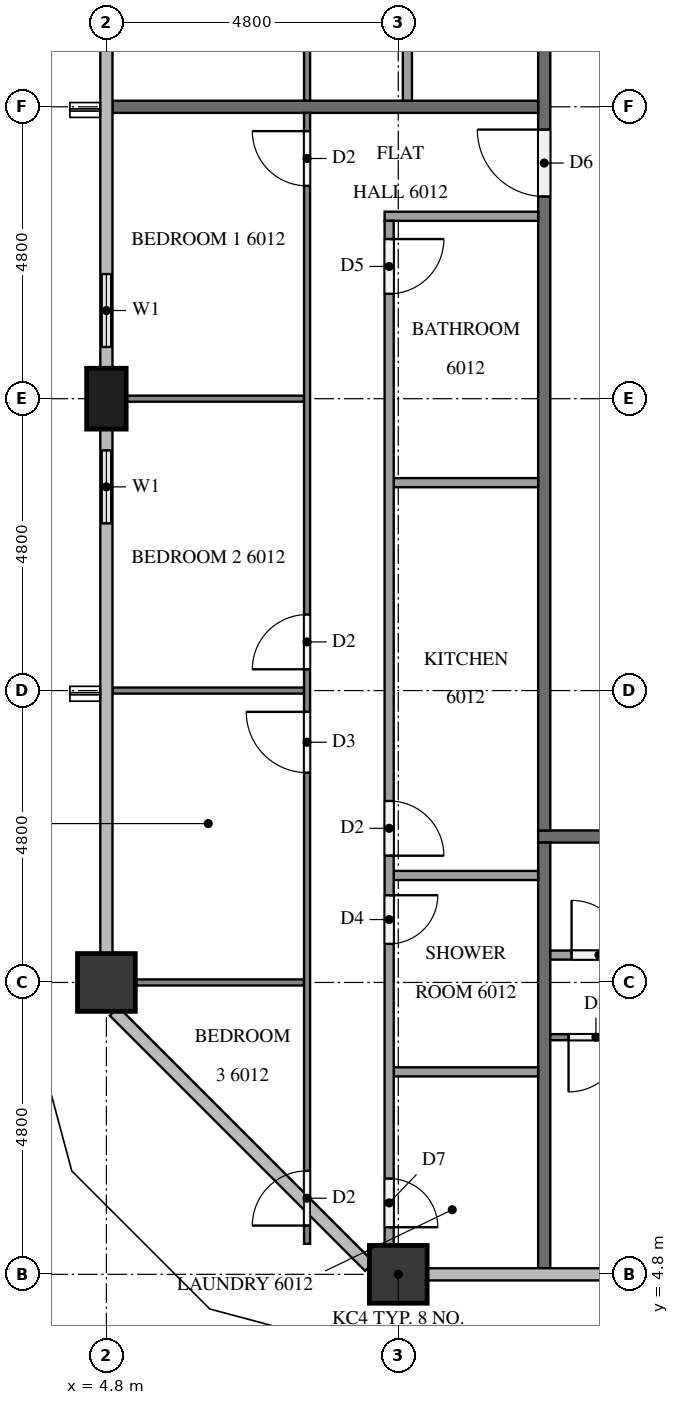
"""IFC4 building model, lengths in metres.
Left out: names, types, materials, properties, quantities, classifications, styles, units other than length and angle.
Written with IfcOpenShell. Run it as: python <this file> out.ifc"""

import sys

from ifc_helpers import new_model, si_unit, direction, frame, frame_2d, origin, origin_2d, place, context, subcontext, project, spatial, rectangle, extrude, element, fill, save


model = new_model("IFC4")
c1 = context("Model", 3, precision=1e-05, world=origin(), true_north=direction((0.0, 1.0)))
c2 = subcontext(c1, "Body", "Model", "MODEL_VIEW")
j1 = project(units=[si_unit("LENGTHUNIT", "METRE"), si_unit("PLANEANGLEUNIT", "RADIAN")], contexts=[c1])
p1 = place(None, origin())
s1 = spatial("IfcSite", under=j1, at=p1, CompositionType="ELEMENT")
p2 = place(p1, origin())
s2 = spatial("IfcBuilding", under=s1, at=p2, CompositionType="ELEMENT")
p3 = place(p2, frame((0.0, 0.0, 229.8)))
s3 = spatial("IfcBuildingStorey", under=s2, at=p3, CompositionType="ELEMENT", Elevation=229.8)
p4 = place(p3, frame((9.6, 4.8, 0.0), z_axis=(0.0, 0.0, 1.0), x_axis=(1.0, 0.0, 0.0)))
e1 = element("IfcColumn", 1, at=p4, inside=s3, PredefinedType="COLUMN", context=c2, shape_type="SweptSolid", body=[
    extrude(rectangle(XDim=0.95, YDim=0.95, at=origin_2d()), origin(), (0.0, 0.0, 1.0), 3.1),
])
p5 = place(p3, frame((4.8, 19.2, 0.0), z_axis=(0.0, 0.0, 1.0), x_axis=(0.0, 1.0, 0.0)))
e2 = element("IfcColumn", 2, at=p5, inside=s3, PredefinedType="COLUMN", context=c2, shape_type="SweptSolid", body=[
    extrude(rectangle(XDim=1.0, YDim=0.65, at=origin_2d()), origin(), (0.0, 0.0, 1.0), 3.1),
])
p6 = place(p3, frame((4.8, 9.6, 0.0), z_axis=(0.0, 0.0, 1.0), x_axis=(1.0, 0.0, 0.0)))
e3 = element("IfcColumn", 3, at=p6, inside=s3, PredefinedType="COLUMN", context=c2, shape_type="SweptSolid", body=[
    extrude(rectangle(XDim=0.95, YDim=0.95, at=origin_2d()), origin(), (0.0, 0.0, 1.0), 3.1),
])
p7 = place(p3, frame((4.8, 21.6, 0.0), z_axis=(0.0, 0.0, 1.0), x_axis=(0.0, -1.0, 0.0)))
e4 = element("IfcWall", 4, at=p7, inside=s3, PredefinedType="SOLIDWALL", context=c2, shape_type="SweptSolid", body=[
    extrude(rectangle(XDim=1.9, YDim=0.15, at=frame_2d((0.95, 0.0))), origin(), (0.0, 0.0, 1.0), 3.1),
])
p8 = place(p7, frame((0.35, 0.0, 0.9)))
e5 = element("IfcOpeningElement", 5, at=p8, cuts=e4, PredefinedType="OPENING", context=c2, shape_type="SweptSolid", body=[
    extrude(rectangle(XDim=1.2, YDim=1.4, at=frame_2d((0.6, 0.7))), frame((0.0, 0.085, 0.0), z_axis=(0.0, -1.0, 0.0), x_axis=(1.0, 0.0, 0.0)), (0.0, 0.0, 1.0), 0.17),
])
p9 = place(p3, frame((4.8, 18.7, 0.0), z_axis=(0.0, 0.0, 1.0), x_axis=(0.0, -1.0, 0.0)))
e6 = element("IfcWall", 6, at=p9, inside=s3, PredefinedType="SOLIDWALL", context=c2, shape_type="SweptSolid", body=[
    extrude(rectangle(XDim=1.9, YDim=0.15, at=frame_2d((0.95, 0.0))), origin(), (0.0, 0.0, 1.0), 3.1),
])
p10 = place(p9, frame((0.35, 0.0, 0.9)))
e7 = element("IfcOpeningElement", 7, at=p10, cuts=e6, PredefinedType="OPENING", context=c2, shape_type="SweptSolid", body=[
    extrude(rectangle(XDim=1.2, YDim=1.4, at=frame_2d((0.6, 0.7))), frame((0.0, 0.085, 0.0), z_axis=(0.0, -1.0, 0.0), x_axis=(1.0, 0.0, 0.0)), (0.0, 0.0, 1.0), 0.17),
])
p11 = place(p3, frame((50.5, 12.0, 0.0), z_axis=(0.0, 0.0, 1.0), x_axis=(-1.0, 0.0, 0.0)))
e8 = element("IfcWall", 8, at=p11, inside=s3, PredefinedType="PARTITIONING", context=c2, shape_type="SweptSolid", body=[
    extrude(rectangle(XDim=38.6, YDim=0.2, at=frame_2d((19.3, 0.0))), origin(), (0.0, 0.0, 1.0), 3.1),
])
p12 = place(p11, frame((19.675, 0.0, 0.0)))
e9 = element("IfcOpeningElement", 9, at=p12, cuts=e8, PredefinedType="OPENING", context=c2, shape_type="SweptSolid", body=[
    extrude(rectangle(XDim=1.1, YDim=2.1, at=frame_2d((0.55, 1.05))), frame((0.0, 0.11, 0.0), z_axis=(0.0, -1.0, 0.0), x_axis=(1.0, 0.0, 0.0)), (0.0, 0.0, 1.0), 0.22),
])
p13 = place(p11, frame((2.925, 0.0, 0.0)))
e10 = element("IfcOpeningElement", 10, at=p13, cuts=e8, PredefinedType="OPENING", context=c2, shape_type="SweptSolid", body=[
    extrude(rectangle(XDim=1.0, YDim=2.1, at=frame_2d((0.5, 1.05))), frame((0.0, 0.11, 0.0), z_axis=(0.0, -1.0, 0.0), x_axis=(1.0, 0.0, 0.0)), (0.0, 0.0, 1.0), 0.22),
])
p14 = place(p11, frame((1.075, 0.0, 0.0)))
e11 = element("IfcOpeningElement", 11, at=p14, cuts=e8, PredefinedType="OPENING", context=c2, shape_type="SweptSolid", body=[
    extrude(rectangle(XDim=1.0, YDim=2.1, at=frame_2d((0.5, 1.05))), frame((0.0, 0.11, 0.0), z_axis=(0.0, -1.0, 0.0), x_axis=(1.0, 0.0, 0.0)), (0.0, 0.0, 1.0), 0.22),
])
p15 = place(p3, frame((12.0, 12.1, 0.0), z_axis=(0.0, 0.0, 1.0), x_axis=(0.0, 1.0, 0.0)))
e12 = element("IfcWall", 12, at=p15, inside=s3, PredefinedType="PARTITIONING", context=c2, shape_type="SweptSolid", body=[
    extrude(rectangle(XDim=28.6, YDim=0.2, at=frame_2d((14.3, 0.0))), origin(), (0.0, 0.0, 1.0), 3.1),
])
p16 = place(p15, frame((27.275, 0.0, 0.0)))
e13 = element("IfcOpeningElement", 13, at=p16, cuts=e12, PredefinedType="OPENING", context=c2, shape_type="SweptSolid", body=[
    extrude(rectangle(XDim=1.0, YDim=2.1, at=frame_2d((0.5, 1.05))), frame((0.0, 0.11, 0.0), z_axis=(0.0, -1.0, 0.0), x_axis=(1.0, 0.0, 0.0)), (0.0, 0.0, 1.0), 0.22),
])
p17 = place(p15, frame((20.075, 0.0, 0.0)))
e14 = element("IfcOpeningElement", 14, at=p17, cuts=e12, PredefinedType="OPENING", context=c2, shape_type="SweptSolid", body=[
    extrude(rectangle(XDim=1.0, YDim=2.1, at=frame_2d((0.5, 1.05))), frame((0.0, 0.11, 0.0), z_axis=(0.0, -1.0, 0.0), x_axis=(1.0, 0.0, 0.0)), (0.0, 0.0, 1.0), 0.22),
])
p18 = place(p15, frame((10.425, 0.0, 0.0)))
e15 = element("IfcOpeningElement", 15, at=p18, cuts=e12, PredefinedType="OPENING", context=c2, shape_type="SweptSolid", body=[
    extrude(rectangle(XDim=1.1, YDim=2.1, at=frame_2d((0.55, 1.05))), frame((0.0, 0.11, 0.0), z_axis=(0.0, -1.0, 0.0), x_axis=(1.0, 0.0, 0.0)), (0.0, 0.0, 1.0), 0.22),
])
for number, where, z_axis, x_axis in (
    (16, (12.0, 4.9, 0.0), (0.0, 0.0, 1.0), (0.0, 1.0, 0.0)),
    (17, (4.9, 24.0, 0.0), (0.0, 0.0, 1.0), (1.0, 0.0, 0.0)),
):
    element("IfcWall", number, at=place(p3, frame(where, z_axis=z_axis, x_axis=x_axis)), inside=s3, PredefinedType="PARTITIONING", context=c2, shape_type="SweptSolid", body=[
        extrude(rectangle(XDim=7.0, YDim=0.2, at=frame_2d((3.5, 0.0))), origin(), (0.0, 0.0, 1.0), 3.1),
    ])
p19 = place(p3, frame((31.1, 8.7, 0.0), z_axis=(0.0, 0.0, 1.0), x_axis=(-1.0, 0.0, 0.0)))
e18 = element("IfcWall", 18, at=p19, inside=s3, PredefinedType="PARTITIONING", context=c2, shape_type="SweptSolid", body=[
    extrude(rectangle(XDim=19.0, YDim=0.1, at=frame_2d((9.5, 0.0))), origin(), (0.0, 0.0, 1.0), 3.1),
])
p20 = place(p19, frame((0.3, 0.0, 0.0)))
e19 = element("IfcOpeningElement", 19, at=p20, cuts=e18, PredefinedType="OPENING", context=c2, shape_type="SweptSolid", body=[
    extrude(rectangle(XDim=0.9, YDim=2.1, at=frame_2d((0.45, 1.05))), frame((0.0, 0.06, 0.0), z_axis=(0.0, -1.0, 0.0), x_axis=(1.0, 0.0, 0.0)), (0.0, 0.0, 1.0), 0.12),
])
p21 = place(p19, frame((8.25, 0.0, 0.0)))
e20 = element("IfcOpeningElement", 20, at=p21, cuts=e18, PredefinedType="OPENING", context=c2, shape_type="SweptSolid", body=[
    extrude(rectangle(XDim=0.9, YDim=2.1, at=frame_2d((0.45, 1.05))), frame((0.0, 0.06, 0.0), z_axis=(0.0, -1.0, 0.0), x_axis=(1.0, 0.0, 0.0)), (0.0, 0.0, 1.0), 0.12),
])
p22 = place(p19, frame((9.85, 0.0, 0.0)))
e21 = element("IfcOpeningElement", 21, at=p22, cuts=e18, PredefinedType="OPENING", context=c2, shape_type="SweptSolid", body=[
    extrude(rectangle(XDim=1.0, YDim=2.1, at=frame_2d((0.5, 1.05))), frame((0.0, 0.06, 0.0), z_axis=(0.0, -1.0, 0.0), x_axis=(1.0, 0.0, 0.0)), (0.0, 0.0, 1.0), 0.12),
])
p23 = place(p19, frame((17.8, 0.0, 0.0)))
e22 = element("IfcOpeningElement", 22, at=p23, cuts=e18, PredefinedType="OPENING", context=c2, shape_type="SweptSolid", body=[
    extrude(rectangle(XDim=0.9, YDim=2.1, at=frame_2d((0.45, 1.05))), frame((0.0, 0.06, 0.0), z_axis=(0.0, -1.0, 0.0), x_axis=(1.0, 0.0, 0.0)), (0.0, 0.0, 1.0), 0.12),
])
p24 = place(p3, frame((12.1, 10.05, 0.0), z_axis=(0.0, 0.0, 1.0), x_axis=(1.0, 0.0, 0.0)))
e23 = element("IfcWall", 23, at=p24, inside=s3, PredefinedType="PARTITIONING", context=c2, shape_type="SweptSolid", body=[
    extrude(rectangle(XDim=17.225, YDim=0.15, at=frame_2d((8.612, 0.0))), origin(), (0.0, 0.0, 1.0), 3.1),
])
p25 = place(p24, frame((16.125, 0.0, 0.0)))
e24 = element("IfcOpeningElement", 24, at=p25, cuts=e23, PredefinedType="OPENING", context=c2, shape_type="SweptSolid", body=[
    extrude(rectangle(XDim=0.8, YDim=2.1, at=frame_2d((0.4, 1.05))), frame((0.0, 0.085, 0.0), z_axis=(0.0, -1.0, 0.0), x_axis=(1.0, 0.0, 0.0)), (0.0, 0.0, 1.0), 0.17),
])
p26 = place(p24, frame((11.091, 0.0, 0.0)))
e25 = element("IfcOpeningElement", 25, at=p26, cuts=e23, PredefinedType="OPENING", context=c2, shape_type="SweptSolid", body=[
    extrude(rectangle(XDim=0.8, YDim=2.1, at=frame_2d((0.4, 1.05))), frame((0.0, 0.085, 0.0), z_axis=(0.0, -1.0, 0.0), x_axis=(1.0, 0.0, 0.0)), (0.0, 0.0, 1.0), 0.17),
])
p27 = place(p24, frame((9.541, 0.0, 0.0)))
e26 = element("IfcOpeningElement", 26, at=p27, cuts=e23, PredefinedType="OPENING", context=c2, shape_type="SweptSolid", body=[
    extrude(rectangle(XDim=0.9, YDim=2.1, at=frame_2d((0.45, 1.05))), frame((0.0, 0.085, 0.0), z_axis=(0.0, -1.0, 0.0), x_axis=(1.0, 0.0, 0.0)), (0.0, 0.0, 1.0), 0.17),
])
p28 = place(p24, frame((0.35, 0.0, 0.0)))
e27 = element("IfcOpeningElement", 27, at=p28, cuts=e23, PredefinedType="OPENING", context=c2, shape_type="SweptSolid", body=[
    extrude(rectangle(XDim=0.9, YDim=2.1, at=frame_2d((0.45, 1.05))), frame((0.0, 0.085, 0.0), z_axis=(0.0, -1.0, 0.0), x_axis=(1.0, 0.0, 0.0)), (0.0, 0.0, 1.0), 0.17),
])
p29 = place(p3, frame((8.1, 24.1, 0.0), z_axis=(0.0, 0.0, 1.0), x_axis=(0.0, 1.0, 0.0)))
e28 = element("IfcWall", 28, at=p29, inside=s3, PredefinedType="PARTITIONING", context=c2, shape_type="SweptSolid", body=[
    extrude(rectangle(XDim=9.4, YDim=0.1, at=frame_2d((4.7, 0.0))), origin(), (0.0, 0.0, 1.0), 3.1),
])
p30 = place(p29, frame((5.05, 0.0, 0.0)))
e29 = element("IfcOpeningElement", 29, at=p30, cuts=e28, PredefinedType="OPENING", context=c2, shape_type="SweptSolid", body=[
    extrude(rectangle(XDim=1.0, YDim=2.1, at=frame_2d((0.5, 1.05))), frame((0.0, 0.06, 0.0), z_axis=(0.0, -1.0, 0.0), x_axis=(1.0, 0.0, 0.0)), (0.0, 0.0, 1.0), 0.12),
])
p31 = place(p29, frame((3.45, 0.0, 0.0)))
e30 = element("IfcOpeningElement", 30, at=p31, cuts=e28, PredefinedType="OPENING", context=c2, shape_type="SweptSolid", body=[
    extrude(rectangle(XDim=0.9, YDim=2.1, at=frame_2d((0.45, 1.05))), frame((0.0, 0.06, 0.0), z_axis=(0.0, -1.0, 0.0), x_axis=(1.0, 0.0, 0.0)), (0.0, 0.0, 1.0), 0.12),
])
p32 = place(p3, frame((9.75, 31.725, 0.0), z_axis=(0.0, 0.0, 1.0), x_axis=(0.0, -1.0, 0.0)))
e31 = element("IfcWall", 31, at=p32, inside=s3, PredefinedType="PARTITIONING", context=c2, shape_type="SweptSolid", body=[
    extrude(rectangle(XDim=7.625, YDim=0.15, at=frame_2d((3.812, 0.0))), origin(), (0.0, 0.0, 1.0), 3.1),
])
p33 = place(p32, frame((1.925, 0.0, 0.0)))
e32 = element("IfcOpeningElement", 32, at=p33, cuts=e31, PredefinedType="OPENING", context=c2, shape_type="SweptSolid", body=[
    extrude(rectangle(XDim=0.8, YDim=2.1, at=frame_2d((0.4, 1.05))), frame((0.0, 0.085, 0.0), z_axis=(0.0, -1.0, 0.0), x_axis=(1.0, 0.0, 0.0)), (0.0, 0.0, 1.0), 0.17),
])
p34 = place(p32, frame((3.375, 0.0, 0.0)))
e33 = element("IfcOpeningElement", 33, at=p34, cuts=e31, PredefinedType="OPENING", context=c2, shape_type="SweptSolid", body=[
    extrude(rectangle(XDim=0.9, YDim=2.1, at=frame_2d((0.45, 1.05))), frame((0.0, 0.085, 0.0), z_axis=(0.0, -1.0, 0.0), x_axis=(1.0, 0.0, 0.0)), (0.0, 0.0, 1.0), 0.17),
])
p35 = place(p3, frame((8.05, 19.2, 0.0), z_axis=(0.0, 0.0, 1.0), x_axis=(-1.0, 0.0, 0.0)))
e34 = element("IfcWall", 34, at=p35, inside=s3, PredefinedType="PARTITIONING", context=c2, shape_type="SweptSolid", body=[
    extrude(rectangle(XDim=2.925, YDim=0.1, at=frame_2d((1.462, 0.0))), origin(), (0.0, 0.0, 1.0), 3.1),
])
p36 = place(p3, frame((8.05, 14.4, 0.0), z_axis=(0.0, 0.0, 1.0), x_axis=(-1.0, 0.0, 0.0)))
e35 = element("IfcWall", 35, at=p36, inside=s3, PredefinedType="PARTITIONING", context=c2, shape_type="SweptSolid", body=[
    extrude(rectangle(XDim=3.15, YDim=0.1, at=frame_2d((1.575, 0.0))), origin(), (0.0, 0.0, 1.0), 3.1),
])
p37 = place(p3, frame((8.05, 9.6, 0.0), z_axis=(0.0, 0.0, 1.0), x_axis=(-1.0, 0.0, 0.0)))
e36 = element("IfcWall", 36, at=p37, inside=s3, PredefinedType="PARTITIONING", context=c2, shape_type="SweptSolid", body=[
    extrude(rectangle(XDim=2.775, YDim=0.1, at=frame_2d((1.388, 0.0))), origin(), (0.0, 0.0, 1.0), 3.1),
])
p38 = place(p3, frame((8.1, 5.302, 0.0), z_axis=(0.0, 0.0, 1.0), x_axis=(0.0, 1.0, 0.0)))
e37 = element("IfcWall", 37, at=p38, inside=s3, PredefinedType="PARTITIONING", context=c2, shape_type="SweptSolid", body=[
    extrude(rectangle(XDim=18.598, YDim=0.1, at=frame_2d((9.299, 0.0))), origin(), (0.0, 0.0, 1.0), 3.1),
])
p39 = place(p38, frame((17.398, 0.0, 0.0)))
e38 = element("IfcOpeningElement", 38, at=p39, cuts=e37, PredefinedType="OPENING", context=c2, shape_type="SweptSolid", body=[
    extrude(rectangle(XDim=0.9, YDim=2.1, at=frame_2d((0.45, 1.05))), frame((0.0, 0.06, 0.0), z_axis=(0.0, -1.0, 0.0), x_axis=(1.0, 0.0, 0.0)), (0.0, 0.0, 1.0), 0.12),
])
p40 = place(p38, frame((9.448, 0.0, 0.0)))
e39 = element("IfcOpeningElement", 39, at=p40, cuts=e37, PredefinedType="OPENING", context=c2, shape_type="SweptSolid", body=[
    extrude(rectangle(XDim=0.9, YDim=2.1, at=frame_2d((0.45, 1.05))), frame((0.0, 0.06, 0.0), z_axis=(0.0, -1.0, 0.0), x_axis=(1.0, 0.0, 0.0)), (0.0, 0.0, 1.0), 0.12),
])
p41 = place(p38, frame((7.748, 0.0, 0.0)))
e40 = element("IfcOpeningElement", 40, at=p41, cuts=e37, PredefinedType="OPENING", context=c2, shape_type="SweptSolid", body=[
    extrude(rectangle(XDim=1.0, YDim=2.1, at=frame_2d((0.5, 1.05))), frame((0.0, 0.06, 0.0), z_axis=(0.0, -1.0, 0.0), x_axis=(1.0, 0.0, 0.0)), (0.0, 0.0, 1.0), 0.12),
])
p42 = place(p38, frame((0.3, 0.0, 0.0)))
e41 = element("IfcOpeningElement", 41, at=p42, cuts=e37, PredefinedType="OPENING", context=c2, shape_type="SweptSolid", body=[
    extrude(rectangle(XDim=0.9, YDim=2.1, at=frame_2d((0.45, 1.05))), frame((0.0, 0.06, 0.0), z_axis=(0.0, -1.0, 0.0), x_axis=(1.0, 0.0, 0.0)), (0.0, 0.0, 1.0), 0.12),
])
for number, where, z_axis, x_axis in (
    (42, (11.9, 17.819, 0.0), (0.0, 0.0, 1.0), (-1.0, 0.0, 0.0)),
    (43, (11.9, 11.359, 0.0), (0.0, 0.0, 1.0), (-1.0, 0.0, 0.0)),
    (44, (11.9, 8.13, 0.0), (0.0, 0.0, 1.0), (-1.0, 0.0, 0.0)),
):
    element("IfcWall", number, at=place(p3, frame(where, z_axis=z_axis, x_axis=x_axis)), inside=s3, PredefinedType="PARTITIONING", context=c2, shape_type="SweptSolid", body=[
        extrude(rectangle(XDim=2.375, YDim=0.15, at=frame_2d((1.188, 0.0))), origin(), (0.0, 0.0, 1.0), 3.1),
    ])
p43 = place(p3, frame((11.9, 22.2, 0.0), z_axis=(0.0, 0.0, 1.0), x_axis=(-1.0, 0.0, 0.0)))
e45 = element("IfcWall", 45, at=p43, inside=s3, PredefinedType="PARTITIONING", context=c2, shape_type="SweptSolid", body=[
    extrude(rectangle(XDim=2.525, YDim=0.15, at=frame_2d((1.262, 0.0))), origin(), (0.0, 0.0, 1.0), 3.1),
])
p44 = place(p3, frame((9.45, 22.125, 0.0), z_axis=(0.0, 0.0, 1.0), x_axis=(0.0, -1.0, 0.0)))
e46 = element("IfcWall", 46, at=p44, inside=s3, PredefinedType="PARTITIONING", context=c2, shape_type="SweptSolid", body=[
    extrude(rectangle(XDim=16.85, YDim=0.15, at=frame_2d((8.425, 0.0))), origin(), (0.0, 0.0, 1.0), 3.1),
])
p45 = place(p44, frame((0.3, 0.0, 0.0)))
e47 = element("IfcOpeningElement", 47, at=p45, cuts=e46, PredefinedType="OPENING", context=c2, shape_type="SweptSolid", body=[
    extrude(rectangle(XDim=0.9, YDim=2.1, at=frame_2d((0.45, 1.05))), frame((0.0, 0.085, 0.0), z_axis=(0.0, -1.0, 0.0), x_axis=(1.0, 0.0, 0.0)), (0.0, 0.0, 1.0), 0.17),
])
p46 = place(p44, frame((9.541, 0.0, 0.0)))
e48 = element("IfcOpeningElement", 48, at=p46, cuts=e46, PredefinedType="OPENING", context=c2, shape_type="SweptSolid", body=[
    extrude(rectangle(XDim=0.9, YDim=2.1, at=frame_2d((0.45, 1.05))), frame((0.0, 0.085, 0.0), z_axis=(0.0, -1.0, 0.0), x_axis=(1.0, 0.0, 0.0)), (0.0, 0.0, 1.0), 0.17),
])
p47 = place(p44, frame((11.091, 0.0, 0.0)))
e49 = element("IfcOpeningElement", 49, at=p47, cuts=e46, PredefinedType="OPENING", context=c2, shape_type="SweptSolid", body=[
    extrude(rectangle(XDim=0.8, YDim=2.1, at=frame_2d((0.4, 1.05))), frame((0.0, 0.085, 0.0), z_axis=(0.0, -1.0, 0.0), x_axis=(1.0, 0.0, 0.0)), (0.0, 0.0, 1.0), 0.17),
])
p48 = place(p44, frame((15.75, 0.0, 0.0)))
e50 = element("IfcOpeningElement", 50, at=p48, cuts=e46, PredefinedType="OPENING", context=c2, shape_type="SweptSolid", body=[
    extrude(rectangle(XDim=0.8, YDim=2.1, at=frame_2d((0.4, 1.05))), frame((0.0, 0.085, 0.0), z_axis=(0.0, -1.0, 0.0), x_axis=(1.0, 0.0, 0.0)), (0.0, 0.0, 1.0), 0.17),
])
p49 = place(p8, origin())
e51 = element("IfcWindow", 51, at=p49, inside=s3, PartitioningType="SINGLE_PANEL", PredefinedType="WINDOW", context=c2, shape_type="SweptSolid", body=[
    extrude(rectangle(XDim=1.2, YDim=1.4, at=frame_2d((0.6, 0.7))), frame((0.0, 0.03, 0.0), z_axis=(0.0, -1.0, 0.0), x_axis=(1.0, 0.0, 0.0)), (0.0, 0.0, 1.0), 0.06),
])
fill(e5, e51)
p50 = place(p10, origin())
e52 = element("IfcWindow", 52, at=p50, inside=s3, PartitioningType="SINGLE_PANEL", PredefinedType="WINDOW", context=c2, shape_type="SweptSolid", body=[
    extrude(rectangle(XDim=1.2, YDim=1.4, at=frame_2d((0.6, 0.7))), frame((0.0, 0.03, 0.0), z_axis=(0.0, -1.0, 0.0), x_axis=(1.0, 0.0, 0.0)), (0.0, 0.0, 1.0), 0.06),
])
fill(e7, e52)
p51 = place(p18, origin())
e53 = element("IfcDoor", 53, at=p51, inside=s3, OperationType="SINGLE_SWING_RIGHT", PredefinedType="DOOR", context=c2, shape_type="SweptSolid", body=[
    extrude(rectangle(XDim=1.1, YDim=2.1, at=frame_2d((0.55, 1.05))), frame((0.0, 0.025, 0.0), z_axis=(0.0, -1.0, 0.0), x_axis=(1.0, 0.0, 0.0)), (0.0, 0.0, 1.0), 0.05),
])
fill(e15, e53)
p52 = place(p23, origin())
e54 = element("IfcDoor", 54, at=p52, inside=s3, OperationType="SINGLE_SWING_RIGHT", PredefinedType="DOOR", context=c2, shape_type="SweptSolid", body=[
    extrude(rectangle(XDim=0.9, YDim=2.1, at=frame_2d((0.45, 1.05))), frame((0.0, 0.025, 0.0), z_axis=(0.0, -1.0, 0.0), x_axis=(1.0, 0.0, 0.0)), (0.0, 0.0, 1.0), 0.05),
])
fill(e22, e54)
p53 = place(p28, origin())
e55 = element("IfcDoor", 55, at=p53, inside=s3, OperationType="SINGLE_SWING_LEFT", PredefinedType="DOOR", context=c2, shape_type="SweptSolid", body=[
    extrude(rectangle(XDim=0.9, YDim=2.1, at=frame_2d((0.45, 1.05))), frame((0.0, 0.025, 0.0), z_axis=(0.0, -1.0, 0.0), x_axis=(1.0, 0.0, 0.0)), (0.0, 0.0, 1.0), 0.05),
])
fill(e27, e55)
p54 = place(p39, origin())
e56 = element("IfcDoor", 56, at=p54, inside=s3, OperationType="SINGLE_SWING_RIGHT", PredefinedType="DOOR", context=c2, shape_type="SweptSolid", body=[
    extrude(rectangle(XDim=0.9, YDim=2.1, at=frame_2d((0.45, 1.05))), frame((0.0, 0.025, 0.0), z_axis=(0.0, -1.0, 0.0), x_axis=(1.0, 0.0, 0.0)), (0.0, 0.0, 1.0), 0.05),
])
fill(e38, e56)
p55 = place(p40, origin())
e57 = element("IfcDoor", 57, at=p55, inside=s3, OperationType="SINGLE_SWING_LEFT", PredefinedType="DOOR", context=c2, shape_type="SweptSolid", body=[
    extrude(rectangle(XDim=0.9, YDim=2.1, at=frame_2d((0.45, 1.05))), frame((0.0, 0.025, 0.0), z_axis=(0.0, -1.0, 0.0), x_axis=(1.0, 0.0, 0.0)), (0.0, 0.0, 1.0), 0.05),
])
fill(e39, e57)
p56 = place(p41, origin())
e58 = element("IfcDoor", 58, at=p56, inside=s3, OperationType="SINGLE_SWING_RIGHT", PredefinedType="DOOR", context=c2, shape_type="SweptSolid", body=[
    extrude(rectangle(XDim=1.0, YDim=2.1, at=frame_2d((0.5, 1.05))), frame((0.0, 0.025, 0.0), z_axis=(0.0, -1.0, 0.0), x_axis=(1.0, 0.0, 0.0)), (0.0, 0.0, 1.0), 0.05),
])
fill(e40, e58)
p57 = place(p42, origin())
e59 = element("IfcDoor", 59, at=p57, inside=s3, OperationType="SINGLE_SWING_LEFT", PredefinedType="DOOR", context=c2, shape_type="SweptSolid", body=[
    extrude(rectangle(XDim=0.9, YDim=2.1, at=frame_2d((0.45, 1.05))), frame((0.0, 0.025, 0.0), z_axis=(0.0, -1.0, 0.0), x_axis=(1.0, 0.0, 0.0)), (0.0, 0.0, 1.0), 0.05),
])
fill(e41, e59)
p58 = place(p45, origin())
e60 = element("IfcDoor", 60, at=p58, inside=s3, OperationType="SINGLE_SWING_LEFT", PredefinedType="DOOR", context=c2, shape_type="SweptSolid", body=[
    extrude(rectangle(XDim=0.9, YDim=2.1, at=frame_2d((0.45, 1.05))), frame((0.0, 0.025, 0.0), z_axis=(0.0, -1.0, 0.0), x_axis=(1.0, 0.0, 0.0)), (0.0, 0.0, 1.0), 0.05),
])
fill(e47, e60)
p59 = place(p46, origin())
e61 = element("IfcDoor", 61, at=p59, inside=s3, OperationType="SINGLE_SWING_RIGHT", PredefinedType="DOOR", context=c2, shape_type="SweptSolid", body=[
    extrude(rectangle(XDim=0.9, YDim=2.1, at=frame_2d((0.45, 1.05))), frame((0.0, 0.025, 0.0), z_axis=(0.0, -1.0, 0.0), x_axis=(1.0, 0.0, 0.0)), (0.0, 0.0, 1.0), 0.05),
])
fill(e48, e61)
p60 = place(p47, origin())
e62 = element("IfcDoor", 62, at=p60, inside=s3, OperationType="SINGLE_SWING_LEFT", PredefinedType="DOOR", context=c2, shape_type="SweptSolid", body=[
    extrude(rectangle(XDim=0.8, YDim=2.1, at=frame_2d((0.4, 1.05))), frame((0.0, 0.025, 0.0), z_axis=(0.0, -1.0, 0.0), x_axis=(1.0, 0.0, 0.0)), (0.0, 0.0, 1.0), 0.05),
])
fill(e49, e62)
p61 = place(p48, origin())
e63 = element("IfcDoor", 63, at=p61, inside=s3, OperationType="SINGLE_SWING_RIGHT", PredefinedType="DOOR", context=c2, shape_type="SweptSolid", body=[
    extrude(rectangle(XDim=0.8, YDim=2.1, at=frame_2d((0.4, 1.05))), frame((0.0, 0.025, 0.0), z_axis=(0.0, -1.0, 0.0), x_axis=(1.0, 0.0, 0.0)), (0.0, 0.0, 1.0), 0.05),
])
fill(e50, e63)
save(model, sys.argv[1])
